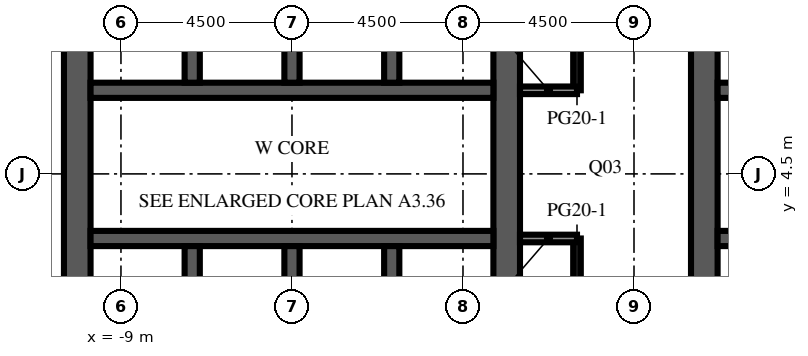
"""IFC4 building model, lengths in metres.
Left out: names, types, materials, properties, quantities, classifications, styles, units other than length and angle.
Written with IfcOpenShell. Run it as: python <this file> out.ifc"""

import sys

from ifc_helpers import new_model, si_unit, direction, frame, frame_2d, origin, place, context, subcontext, project, spatial, rectangle, extrude, element, fill, save


model = new_model("IFC4")
c1 = context("Model", 3, precision=1e-05, world=origin(), true_north=direction((0.0, 1.0)))
c2 = subcontext(c1, "Body", "Model", "MODEL_VIEW")
j1 = project(units=[si_unit("LENGTHUNIT", "METRE"), si_unit("PLANEANGLEUNIT", "RADIAN")], contexts=[c1])
p1 = place(None, origin())
s1 = spatial("IfcSite", under=j1, at=p1, CompositionType="ELEMENT")
p2 = place(p1, origin())
s2 = spatial("IfcBuilding", under=s1, at=p2, CompositionType="ELEMENT")
p3 = place(p2, frame((0.0, 0.0, 248.0)))
s3 = spatial("IfcBuildingStorey", under=s2, at=p3, CompositionType="ELEMENT", Elevation=248.0)
p4 = place(p3, frame((-10.15, -9.0, 0.0), z_axis=(0.0, 0.0, 1.0), x_axis=(0.0, 1.0, 0.0)))
e1 = element("IfcWall", 1, at=p4, inside=s3, PredefinedType="SHEAR", context=c2, shape_type="SweptSolid", body=[
    extrude(rectangle(XDim=27.5, YDim=0.7, at=frame_2d((13.75, 0.0))), origin(), (0.0, 0.0, 1.0), 4.1),
])
p5 = place(p4, frame((12.55, 0.0, 0.0)))
e2 = element("IfcOpeningElement", 2, at=p5, cuts=e1, PredefinedType="OPENING", context=c2, shape_type="SweptSolid", body=[
    extrude(rectangle(XDim=2.4, YDim=2.4, at=frame_2d((1.2, 1.2))), frame((0.0, 0.36, 0.0), z_axis=(0.0, -1.0, 0.0), x_axis=(1.0, 0.0, 0.0)), (0.0, 0.0, 1.0), 0.72),
])
p6 = place(p4, frame((6.825, 0.0, 0.0)))
e3 = element("IfcOpeningElement", 3, at=p6, cuts=e1, PredefinedType="OPENING", context=c2, shape_type="SweptSolid", body=[
    extrude(rectangle(XDim=1.2, YDim=2.1, at=frame_2d((0.6, 1.05))), frame((0.0, 0.36, 0.0), z_axis=(0.0, -1.0, 0.0), x_axis=(1.0, 0.0, 0.0)), (0.0, 0.0, 1.0), 0.72),
])
p7 = place(p4, frame((19.475, 0.0, 0.0)))
e4 = element("IfcOpeningElement", 4, at=p7, cuts=e1, PredefinedType="OPENING", context=c2, shape_type="SweptSolid", body=[
    extrude(rectangle(XDim=1.2, YDim=2.1, at=frame_2d((0.6, 1.05))), frame((0.0, 0.36, 0.0), z_axis=(0.0, -1.0, 0.0), x_axis=(1.0, 0.0, 0.0)), (0.0, 0.0, 1.0), 0.72),
])
p8 = place(p3, frame((1.15, -9.0, 0.0), z_axis=(0.0, 0.0, 1.0), x_axis=(0.0, 1.0, 0.0)))
e5 = element("IfcWall", 5, at=p8, inside=s3, PredefinedType="SHEAR", context=c2, shape_type="SweptSolid", body=[
    extrude(rectangle(XDim=27.5, YDim=0.7, at=frame_2d((13.75, 0.0))), origin(), (0.0, 0.0, 1.0), 4.1),
])
p9 = place(p8, frame((12.55, 0.0, 0.0)))
e6 = element("IfcOpeningElement", 6, at=p9, cuts=e5, PredefinedType="OPENING", context=c2, shape_type="SweptSolid", body=[
    extrude(rectangle(XDim=2.4, YDim=2.4, at=frame_2d((1.2, 1.2))), frame((0.0, 0.36, 0.0), z_axis=(0.0, -1.0, 0.0), x_axis=(1.0, 0.0, 0.0)), (0.0, 0.0, 1.0), 0.72),
])
p10 = place(p8, frame((3.9, 0.0, 0.0)))
e7 = element("IfcOpeningElement", 7, at=p10, cuts=e5, PredefinedType="OPENING", context=c2, shape_type="SweptSolid", body=[
    extrude(rectangle(XDim=1.2, YDim=2.1, at=frame_2d((0.6, 1.05))), frame((0.0, 0.36, 0.0), z_axis=(0.0, -1.0, 0.0), x_axis=(1.0, 0.0, 0.0)), (0.0, 0.0, 1.0), 0.72),
])
p11 = place(p8, frame((22.4, 0.0, 0.0)))
e8 = element("IfcOpeningElement", 8, at=p11, cuts=e5, PredefinedType="OPENING", context=c2, shape_type="SweptSolid", body=[
    extrude(rectangle(XDim=1.2, YDim=2.1, at=frame_2d((0.6, 1.05))), frame((0.0, 0.36, 0.0), z_axis=(0.0, -1.0, 0.0), x_axis=(1.0, 0.0, 0.0)), (0.0, 0.0, 1.0), 0.72),
])
p12 = place(p3, frame((-9.8, 2.8, 0.0), z_axis=(0.0, 0.0, 1.0), x_axis=(1.0, 0.0, 0.0)))
e9 = element("IfcWall", 9, at=p12, inside=s3, PredefinedType="SHEAR", context=c2, shape_type="SweptSolid", body=[
    extrude(rectangle(XDim=10.6, YDim=0.4, at=frame_2d((5.3, 0.0))), origin(), (0.0, 0.0, 1.0), 4.1),
])
p13 = place(p12, frame((0.688, 0.0, 0.0)))
e10 = element("IfcOpeningElement", 10, at=p13, cuts=e9, PredefinedType="OPENING", context=c2, shape_type="SweptSolid", body=[
    extrude(rectangle(XDim=1.1, YDim=2.1, at=frame_2d((0.55, 1.05))), frame((0.0, 0.21, 0.0), z_axis=(0.0, -1.0, 0.0), x_axis=(1.0, 0.0, 0.0)), (0.0, 0.0, 1.0), 0.42),
])
p14 = place(p12, frame((3.438, 0.0, 0.0)))
e11 = element("IfcOpeningElement", 11, at=p14, cuts=e9, PredefinedType="OPENING", context=c2, shape_type="SweptSolid", body=[
    extrude(rectangle(XDim=1.1, YDim=2.1, at=frame_2d((0.55, 1.05))), frame((0.0, 0.21, 0.0), z_axis=(0.0, -1.0, 0.0), x_axis=(1.0, 0.0, 0.0)), (0.0, 0.0, 1.0), 0.42),
])
p15 = place(p12, frame((6.113, 0.0, 0.0)))
e12 = element("IfcOpeningElement", 12, at=p15, cuts=e9, PredefinedType="OPENING", context=c2, shape_type="SweptSolid", body=[
    extrude(rectangle(XDim=1.0, YDim=2.1, at=frame_2d((0.5, 1.05))), frame((0.0, 0.21, 0.0), z_axis=(0.0, -1.0, 0.0), x_axis=(1.0, 0.0, 0.0)), (0.0, 0.0, 1.0), 0.42),
])
p16 = place(p12, frame((8.863, 0.0, 0.0)))
e13 = element("IfcOpeningElement", 13, at=p16, cuts=e9, PredefinedType="OPENING", context=c2, shape_type="SweptSolid", body=[
    extrude(rectangle(XDim=1.0, YDim=2.1, at=frame_2d((0.5, 1.05))), frame((0.0, 0.21, 0.0), z_axis=(0.0, -1.0, 0.0), x_axis=(1.0, 0.0, 0.0)), (0.0, 0.0, 1.0), 0.42),
])
p17 = place(p3, frame((-9.8, 6.7, 0.0), z_axis=(0.0, 0.0, 1.0), x_axis=(1.0, 0.0, 0.0)))
e14 = element("IfcWall", 14, at=p17, inside=s3, PredefinedType="SHEAR", context=c2, shape_type="SweptSolid", body=[
    extrude(rectangle(XDim=10.6, YDim=0.4, at=frame_2d((5.3, 0.0))), origin(), (0.0, 0.0, 1.0), 4.1),
])
p18 = place(p17, frame((3.438, 0.0, 0.0)))
e15 = element("IfcOpeningElement", 15, at=p18, cuts=e14, PredefinedType="OPENING", context=c2, shape_type="SweptSolid", body=[
    extrude(rectangle(XDim=1.1, YDim=2.1, at=frame_2d((0.55, 1.05))), frame((0.0, 0.21, 0.0), z_axis=(0.0, -1.0, 0.0), x_axis=(1.0, 0.0, 0.0)), (0.0, 0.0, 1.0), 0.42),
])
p19 = place(p17, frame((6.062, 0.0, 0.0)))
e16 = element("IfcOpeningElement", 16, at=p19, cuts=e14, PredefinedType="OPENING", context=c2, shape_type="SweptSolid", body=[
    extrude(rectangle(XDim=1.1, YDim=2.1, at=frame_2d((0.55, 1.05))), frame((0.0, 0.21, 0.0), z_axis=(0.0, -1.0, 0.0), x_axis=(1.0, 0.0, 0.0)), (0.0, 0.0, 1.0), 0.42),
])
p20 = place(p17, frame((8.812, 0.0, 0.0)))
e17 = element("IfcOpeningElement", 17, at=p20, cuts=e14, PredefinedType="OPENING", context=c2, shape_type="SweptSolid", body=[
    extrude(rectangle(XDim=1.1, YDim=2.1, at=frame_2d((0.55, 1.05))), frame((0.0, 0.21, 0.0), z_axis=(0.0, -1.0, 0.0), x_axis=(1.0, 0.0, 0.0)), (0.0, 0.0, 1.0), 0.42),
])
p21 = place(p17, frame((0.738, 0.0, 0.0)))
e18 = element("IfcOpeningElement", 18, at=p21, cuts=e14, PredefinedType="OPENING", context=c2, shape_type="SweptSolid", body=[
    extrude(rectangle(XDim=1.0, YDim=2.1, at=frame_2d((0.5, 1.05))), frame((0.0, 0.21, 0.0), z_axis=(0.0, -1.0, 0.0), x_axis=(1.0, 0.0, 0.0)), (0.0, 0.0, 1.0), 0.42),
])
for number, where, z_axis, x_axis in (
    (19, (-7.125, -0.3, 0.0), (0.0, 0.0, 1.0), (0.0, 1.0, 0.0)),
    (20, (-7.125, 6.9, 0.0), (0.0, 0.0, 1.0), (0.0, 1.0, 0.0)),
    (21, (-4.5, -0.3, 0.0), (0.0, 0.0, 1.0), (0.0, 1.0, 0.0)),
    (22, (-4.5, 6.9, 0.0), (0.0, 0.0, 1.0), (0.0, 1.0, 0.0)),
    (23, (-1.875, -0.3, 0.0), (0.0, 0.0, 1.0), (0.0, 1.0, 0.0)),
    (24, (-1.875, 6.9, 0.0), (0.0, 0.0, 1.0), (0.0, 1.0, 0.0)),
):
    element("IfcWall", number, at=place(p3, frame(where, z_axis=z_axis, x_axis=x_axis)), inside=s3, PredefinedType="SHEAR", context=c2, shape_type="SweptSolid", body=[
        extrude(rectangle(XDim=2.9, YDim=0.4, at=frame_2d((1.45, 0.0))), origin(), (0.0, 0.0, 1.0), 4.1),
    ])
p22 = place(p3, frame((6.35, -9.0, 0.0), z_axis=(0.0, 0.0, 1.0), x_axis=(0.0, 1.0, 0.0)))
e25 = element("IfcWall", 25, at=p22, inside=s3, PredefinedType="SHEAR", context=c2, shape_type="SweptSolid", body=[
    extrude(rectangle(XDim=27.5, YDim=0.7, at=frame_2d((13.75, 0.0))), origin(), (0.0, 0.0, 1.0), 4.1),
])
p23 = place(p22, frame((12.55, 0.0, 0.0)))
e26 = element("IfcOpeningElement", 26, at=p23, cuts=e25, PredefinedType="OPENING", context=c2, shape_type="SweptSolid", body=[
    extrude(rectangle(XDim=2.4, YDim=2.4, at=frame_2d((1.2, 1.2))), frame((0.0, 0.36, 0.0), z_axis=(0.0, -1.0, 0.0), x_axis=(1.0, 0.0, 0.0)), (0.0, 0.0, 1.0), 0.72),
])
p24 = place(p22, frame((3.9, 0.0, 0.0)))
e27 = element("IfcOpeningElement", 27, at=p24, cuts=e25, PredefinedType="OPENING", context=c2, shape_type="SweptSolid", body=[
    extrude(rectangle(XDim=1.2, YDim=2.1, at=frame_2d((0.6, 1.05))), frame((0.0, 0.36, 0.0), z_axis=(0.0, -1.0, 0.0), x_axis=(1.0, 0.0, 0.0)), (0.0, 0.0, 1.0), 0.72),
])
p25 = place(p22, frame((22.4, 0.0, 0.0)))
e28 = element("IfcOpeningElement", 28, at=p25, cuts=e25, PredefinedType="OPENING", context=c2, shape_type="SweptSolid", body=[
    extrude(rectangle(XDim=1.2, YDim=2.1, at=frame_2d((0.6, 1.05))), frame((0.0, 0.36, 0.0), z_axis=(0.0, -1.0, 0.0), x_axis=(1.0, 0.0, 0.0)), (0.0, 0.0, 1.0), 0.72),
])
p26 = place(p3, frame((6.7, 2.8, 0.0), z_axis=(0.0, 0.0, 1.0), x_axis=(1.0, 0.0, 0.0)))
e29 = element("IfcWall", 29, at=p26, inside=s3, PredefinedType="SHEAR", context=c2, shape_type="SweptSolid", body=[
    extrude(rectangle(XDim=10.6, YDim=0.4, at=frame_2d((5.3, 0.0))), origin(), (0.0, 0.0, 1.0), 4.1),
])
p27 = place(p26, frame((0.688, 0.0, 0.0)))
e30 = element("IfcOpeningElement", 30, at=p27, cuts=e29, PredefinedType="OPENING", context=c2, shape_type="SweptSolid", body=[
    extrude(rectangle(XDim=1.1, YDim=2.1, at=frame_2d((0.55, 1.05))), frame((0.0, 0.21, 0.0), z_axis=(0.0, -1.0, 0.0), x_axis=(1.0, 0.0, 0.0)), (0.0, 0.0, 1.0), 0.42),
])
p28 = place(p26, frame((3.438, 0.0, 0.0)))
e31 = element("IfcOpeningElement", 31, at=p28, cuts=e29, PredefinedType="OPENING", context=c2, shape_type="SweptSolid", body=[
    extrude(rectangle(XDim=1.1, YDim=2.1, at=frame_2d((0.55, 1.05))), frame((0.0, 0.21, 0.0), z_axis=(0.0, -1.0, 0.0), x_axis=(1.0, 0.0, 0.0)), (0.0, 0.0, 1.0), 0.42),
])
p29 = place(p26, frame((6.113, 0.0, 0.0)))
e32 = element("IfcOpeningElement", 32, at=p29, cuts=e29, PredefinedType="OPENING", context=c2, shape_type="SweptSolid", body=[
    extrude(rectangle(XDim=1.0, YDim=2.1, at=frame_2d((0.5, 1.05))), frame((0.0, 0.21, 0.0), z_axis=(0.0, -1.0, 0.0), x_axis=(1.0, 0.0, 0.0)), (0.0, 0.0, 1.0), 0.42),
])
p30 = place(p26, frame((8.863, 0.0, 0.0)))
e33 = element("IfcOpeningElement", 33, at=p30, cuts=e29, PredefinedType="OPENING", context=c2, shape_type="SweptSolid", body=[
    extrude(rectangle(XDim=1.0, YDim=2.1, at=frame_2d((0.5, 1.05))), frame((0.0, 0.21, 0.0), z_axis=(0.0, -1.0, 0.0), x_axis=(1.0, 0.0, 0.0)), (0.0, 0.0, 1.0), 0.42),
])
p31 = place(p3, frame((6.7, 6.7, 0.0), z_axis=(0.0, 0.0, 1.0), x_axis=(1.0, 0.0, 0.0)))
e34 = element("IfcWall", 34, at=p31, inside=s3, PredefinedType="SHEAR", context=c2, shape_type="SweptSolid", body=[
    extrude(rectangle(XDim=10.6, YDim=0.4, at=frame_2d((5.3, 0.0))), origin(), (0.0, 0.0, 1.0), 4.1),
])
p32 = place(p31, frame((3.438, 0.0, 0.0)))
e35 = element("IfcOpeningElement", 35, at=p32, cuts=e34, PredefinedType="OPENING", context=c2, shape_type="SweptSolid", body=[
    extrude(rectangle(XDim=1.1, YDim=2.1, at=frame_2d((0.55, 1.05))), frame((0.0, 0.21, 0.0), z_axis=(0.0, -1.0, 0.0), x_axis=(1.0, 0.0, 0.0)), (0.0, 0.0, 1.0), 0.42),
])
p33 = place(p31, frame((6.062, 0.0, 0.0)))
e36 = element("IfcOpeningElement", 36, at=p33, cuts=e34, PredefinedType="OPENING", context=c2, shape_type="SweptSolid", body=[
    extrude(rectangle(XDim=1.1, YDim=2.1, at=frame_2d((0.55, 1.05))), frame((0.0, 0.21, 0.0), z_axis=(0.0, -1.0, 0.0), x_axis=(1.0, 0.0, 0.0)), (0.0, 0.0, 1.0), 0.42),
])
p34 = place(p31, frame((8.812, 0.0, 0.0)))
e37 = element("IfcOpeningElement", 37, at=p34, cuts=e34, PredefinedType="OPENING", context=c2, shape_type="SweptSolid", body=[
    extrude(rectangle(XDim=1.1, YDim=2.1, at=frame_2d((0.55, 1.05))), frame((0.0, 0.21, 0.0), z_axis=(0.0, -1.0, 0.0), x_axis=(1.0, 0.0, 0.0)), (0.0, 0.0, 1.0), 0.42),
])
p35 = place(p31, frame((0.738, 0.0, 0.0)))
e38 = element("IfcOpeningElement", 38, at=p35, cuts=e34, PredefinedType="OPENING", context=c2, shape_type="SweptSolid", body=[
    extrude(rectangle(XDim=1.0, YDim=2.1, at=frame_2d((0.5, 1.05))), frame((0.0, 0.21, 0.0), z_axis=(0.0, -1.0, 0.0), x_axis=(1.0, 0.0, 0.0)), (0.0, 0.0, 1.0), 0.42),
])
p36 = place(p3, frame((3.0, -3.5, 0.0), z_axis=(0.0, 0.0, 1.0), x_axis=(0.0, 1.0, 0.0)))
e39 = element("IfcWall", 39, at=p36, inside=s3, PredefinedType="PARTITIONING", context=c2, shape_type="SweptSolid", body=[
    extrude(rectangle(XDim=6.3, YDim=0.2, at=frame_2d((3.15, 0.0))), origin(), (0.0, 0.0, 1.0), 3.65),
])
p37 = place(p36, frame((2.35, 0.0, 0.0)))
e40 = element("IfcOpeningElement", 40, at=p37, cuts=e39, PredefinedType="OPENING", context=c2, shape_type="SweptSolid", body=[
    extrude(rectangle(XDim=1.0, YDim=2.1, at=frame_2d((0.5, 1.05))), frame((0.0, 0.11, 0.0), z_axis=(0.0, -1.0, 0.0), x_axis=(1.0, 0.0, 0.0)), (0.0, 0.0, 1.0), 0.22),
])
p38 = place(p3, frame((3.0, 6.7, 0.0), z_axis=(0.0, 0.0, 1.0), x_axis=(0.0, 1.0, 0.0)))
e41 = element("IfcWall", 41, at=p38, inside=s3, PredefinedType="PARTITIONING", context=c2, shape_type="SweptSolid", body=[
    extrude(rectangle(XDim=11.8, YDim=0.2, at=frame_2d((5.9, 0.0))), origin(), (0.0, 0.0, 1.0), 3.65),
])
p39 = place(p38, frame((6.1, 0.0, 0.0)))
e42 = element("IfcOpeningElement", 42, at=p39, cuts=e41, PredefinedType="OPENING", context=c2, shape_type="SweptSolid", body=[
    extrude(rectangle(XDim=1.0, YDim=2.1, at=frame_2d((0.5, 1.05))), frame((0.0, 0.11, 0.0), z_axis=(0.0, -1.0, 0.0), x_axis=(1.0, 0.0, 0.0)), (0.0, 0.0, 1.0), 0.22),
])
for number, where, z_axis, x_axis in (
    (43, (1.5, 2.8, 0.0), (0.0, 0.0, 1.0), (1.0, 0.0, 0.0)),
    (44, (1.5, 6.7, 0.0), (0.0, 0.0, 1.0), (1.0, 0.0, 0.0)),
):
    element("IfcWall", number, at=place(p3, frame(where, z_axis=z_axis, x_axis=x_axis)), inside=s3, PredefinedType="PARTITIONING", context=c2, shape_type="SweptSolid", body=[
        extrude(rectangle(XDim=1.5, YDim=0.2, at=frame_2d((0.75, 0.0))), origin(), (0.0, 0.0, 1.0), 3.65),
    ])
p40 = place(p13, origin())
e45 = element("IfcDoor", 45, at=p40, inside=s3, OperationType="DOUBLE_DOOR_SLIDING", PredefinedType="DOOR", context=c2, shape_type="SweptSolid", body=[
    extrude(rectangle(XDim=1.1, YDim=2.1, at=frame_2d((0.55, 1.05))), frame((0.0, 0.025, 0.0), z_axis=(0.0, -1.0, 0.0), x_axis=(1.0, 0.0, 0.0)), (0.0, 0.0, 1.0), 0.05),
])
fill(e10, e45)
p41 = place(p14, origin())
e46 = element("IfcDoor", 46, at=p41, inside=s3, OperationType="DOUBLE_DOOR_SLIDING", PredefinedType="DOOR", context=c2, shape_type="SweptSolid", body=[
    extrude(rectangle(XDim=1.1, YDim=2.1, at=frame_2d((0.55, 1.05))), frame((0.0, 0.025, 0.0), z_axis=(0.0, -1.0, 0.0), x_axis=(1.0, 0.0, 0.0)), (0.0, 0.0, 1.0), 0.05),
])
fill(e11, e46)
p42 = place(p18, origin())
e47 = element("IfcDoor", 47, at=p42, inside=s3, OperationType="DOUBLE_DOOR_SLIDING", PredefinedType="DOOR", context=c2, shape_type="SweptSolid", body=[
    extrude(rectangle(XDim=1.1, YDim=2.1, at=frame_2d((0.55, 1.05))), frame((0.0, 0.025, 0.0), z_axis=(0.0, -1.0, 0.0), x_axis=(1.0, 0.0, 0.0)), (0.0, 0.0, 1.0), 0.05),
])
fill(e15, e47)
p43 = place(p19, origin())
e48 = element("IfcDoor", 48, at=p43, inside=s3, OperationType="DOUBLE_DOOR_SLIDING", PredefinedType="DOOR", context=c2, shape_type="SweptSolid", body=[
    extrude(rectangle(XDim=1.1, YDim=2.1, at=frame_2d((0.55, 1.05))), frame((0.0, 0.025, 0.0), z_axis=(0.0, -1.0, 0.0), x_axis=(1.0, 0.0, 0.0)), (0.0, 0.0, 1.0), 0.05),
])
fill(e16, e48)
p44 = place(p20, origin())
e49 = element("IfcDoor", 49, at=p44, inside=s3, OperationType="DOUBLE_DOOR_SLIDING", PredefinedType="DOOR", context=c2, shape_type="SweptSolid", body=[
    extrude(rectangle(XDim=1.1, YDim=2.1, at=frame_2d((0.55, 1.05))), frame((0.0, 0.025, 0.0), z_axis=(0.0, -1.0, 0.0), x_axis=(1.0, 0.0, 0.0)), (0.0, 0.0, 1.0), 0.05),
])
fill(e17, e49)
p45 = place(p5, origin())
e50 = element("IfcDoor", 50, at=p45, inside=s3, OperationType="DOUBLE_DOOR_DOUBLE_SWING", PredefinedType="DOOR", context=c2, shape_type="SweptSolid", body=[
    extrude(rectangle(XDim=2.4, YDim=2.4, at=frame_2d((1.2, 1.2))), frame((0.0, 0.025, 0.0), z_axis=(0.0, -1.0, 0.0), x_axis=(1.0, 0.0, 0.0)), (0.0, 0.0, 1.0), 0.05),
])
fill(e2, e50)
p46 = place(p9, origin())
e51 = element("IfcDoor", 51, at=p46, inside=s3, OperationType="DOUBLE_DOOR_DOUBLE_SWING", PredefinedType="DOOR", context=c2, shape_type="SweptSolid", body=[
    extrude(rectangle(XDim=2.4, YDim=2.4, at=frame_2d((1.2, 1.2))), frame((0.0, 0.025, 0.0), z_axis=(0.0, -1.0, 0.0), x_axis=(1.0, 0.0, 0.0)), (0.0, 0.0, 1.0), 0.05),
])
fill(e6, e51)
p47 = place(p23, origin())
e52 = element("IfcDoor", 52, at=p47, inside=s3, OperationType="DOUBLE_DOOR_DOUBLE_SWING", PredefinedType="DOOR", context=c2, shape_type="SweptSolid", body=[
    extrude(rectangle(XDim=2.4, YDim=2.4, at=frame_2d((1.2, 1.2))), frame((0.0, 0.025, 0.0), z_axis=(0.0, -1.0, 0.0), x_axis=(1.0, 0.0, 0.0)), (0.0, 0.0, 1.0), 0.05),
])
fill(e26, e52)
p48 = place(p15, origin())
e53 = element("IfcDoor", 53, at=p48, inside=s3, OperationType="SINGLE_SWING_LEFT", PredefinedType="DOOR", context=c2, shape_type="SweptSolid", body=[
    extrude(rectangle(XDim=1.0, YDim=2.1, at=frame_2d((0.5, 1.05))), frame((0.0, 0.025, 0.0), z_axis=(0.0, -1.0, 0.0), x_axis=(1.0, 0.0, 0.0)), (0.0, 0.0, 1.0), 0.05),
])
fill(e12, e53)
p49 = place(p16, origin())
e54 = element("IfcDoor", 54, at=p49, inside=s3, OperationType="SINGLE_SWING_RIGHT", PredefinedType="DOOR", context=c2, shape_type="SweptSolid", body=[
    extrude(rectangle(XDim=1.0, YDim=2.1, at=frame_2d((0.5, 1.05))), frame((0.0, 0.025, 0.0), z_axis=(0.0, -1.0, 0.0), x_axis=(1.0, 0.0, 0.0)), (0.0, 0.0, 1.0), 0.05),
])
fill(e13, e54)
p50 = place(p21, origin())
e55 = element("IfcDoor", 55, at=p50, inside=s3, OperationType="SINGLE_SWING_LEFT", PredefinedType="DOOR", context=c2, shape_type="SweptSolid", body=[
    extrude(rectangle(XDim=1.0, YDim=2.1, at=frame_2d((0.5, 1.05))), frame((0.0, 0.025, 0.0), z_axis=(0.0, -1.0, 0.0), x_axis=(1.0, 0.0, 0.0)), (0.0, 0.0, 1.0), 0.05),
])
fill(e18, e55)
save(model, sys.argv[1])
